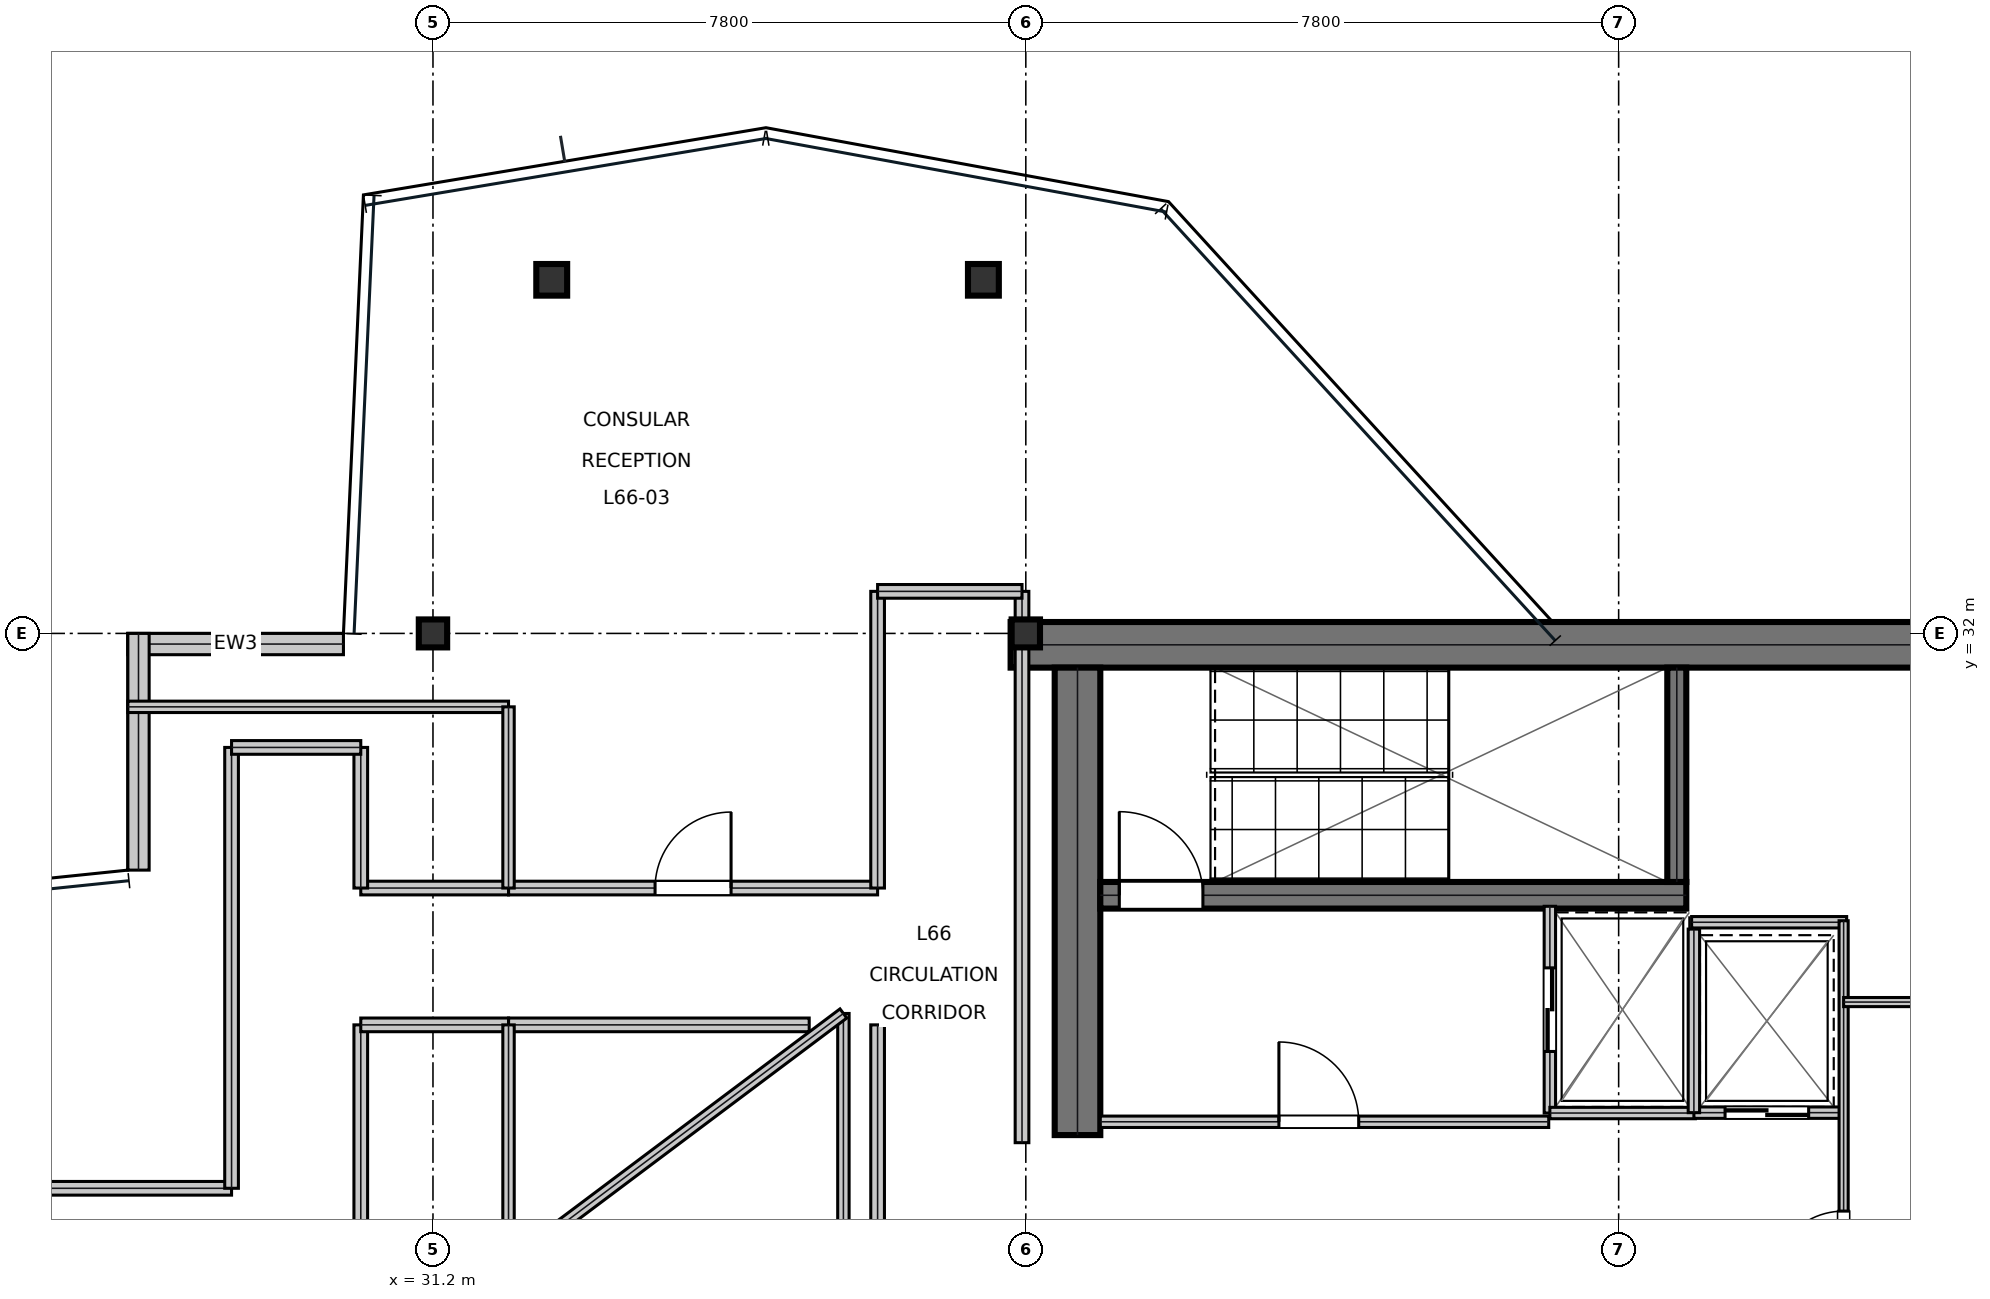
"""IFC4 building model, lengths in metres.
Left out: names, types, materials, properties, quantities, classifications, styles, units other than length and angle.
Written with IfcOpenShell. Run it as: python <this file> out.ifc"""

import sys

from ifc_helpers import new_model, si_unit, direction, frame, frame_2d, origin, origin_2d, place, context, subcontext, project, spatial, rectangle, i_section, extrude, element, fill, save


model = new_model("IFC4")
c1 = context("Model", 3, precision=1e-05, world=origin(), true_north=direction((0.0, 1.0)))
c2 = subcontext(c1, "Body", "Model", "MODEL_VIEW")
j1 = project(units=[si_unit("LENGTHUNIT", "METRE"), si_unit("PLANEANGLEUNIT", "RADIAN")], contexts=[c1])
p1 = place(None, origin())
s1 = spatial("IfcSite", under=j1, at=p1, CompositionType="ELEMENT")
p2 = place(p1, origin())
s2 = spatial("IfcBuilding", under=s1, at=p2, CompositionType="ELEMENT")
p3 = place(p2, frame((0.0, 0.0, 283.05)))
s3 = spatial("IfcBuildingStorey", under=s2, at=p3, CompositionType="ELEMENT", Elevation=283.05)
p4 = place(p3, frame((38.8, 31.85, 0.0), z_axis=(0.0, 0.0, 1.0), x_axis=(1.0, 0.0, 0.0)))
e1 = element("IfcWall", 1, at=p4, inside=s3, PredefinedType="SHEAR", context=c2, shape_type="SweptSolid", body=[
    extrude(rectangle(XDim=16.0, YDim=0.6, at=frame_2d((8.0, 0.0))), origin(), (0.0, 0.0, 1.0), 3.81),
])
p5 = place(p3, frame((39.68, 25.4, 0.0), z_axis=(0.0, 0.0, 1.0), x_axis=(0.0, 1.0, 0.0)))
e2 = element("IfcWall", 2, at=p5, inside=s3, PredefinedType="SHEAR", context=c2, shape_type="SweptSolid", body=[
    extrude(rectangle(XDim=6.15, YDim=0.6, at=frame_2d((3.075, 0.0))), origin(), (0.0, 0.0, 1.0), 3.81),
])
p6 = place(p3, frame((39.98, 28.555, 0.0), z_axis=(0.0, 0.0, 1.0), x_axis=(1.0, 0.0, 0.0)))
e3 = element("IfcWall", 3, at=p6, inside=s3, PredefinedType="SHEAR", context=c2, shape_type="SweptSolid", body=[
    extrude(rectangle(XDim=7.71, YDim=0.35, at=frame_2d((3.855, 0.0))), origin(), (0.0, 0.0, 1.0), 3.81),
])
p7 = place(p6, frame((0.25, 0.0, 0.0)))
e4 = element("IfcOpeningElement", 4, at=p7, cuts=e3, PredefinedType="OPENING", context=c2, shape_type="SweptSolid", body=[
    extrude(rectangle(XDim=1.1, YDim=2.15, at=frame_2d((0.55, 1.075))), frame((0.0, 0.185, 0.0), z_axis=(0.0, -1.0, 0.0), x_axis=(1.0, 0.0, 0.0)), (0.0, 0.0, 1.0), 0.37),
])
p8 = place(p3, frame((47.565, 28.73, 0.0), z_axis=(0.0, 0.0, 1.0), x_axis=(0.0, 1.0, 0.0)))
e5 = element("IfcWall", 5, at=p8, inside=s3, PredefinedType="SHEAR", context=c2, shape_type="SweptSolid", body=[
    extrude(rectangle(XDim=2.82, YDim=0.25, at=frame_2d((1.41, 0.0))), origin(), (0.0, 0.0, 1.0), 3.81),
])
for number, where, z_axis, x_axis in (
    (6, (31.2, 32.0, 0.0), (0.0, 0.0, 1.0), (1.0, 0.0, 0.0)),
    (7, (39.0, 32.0, 0.0), (0.0, 0.0, 1.0), (1.0, 0.0, 0.0)),
):
    element("IfcColumn", number, at=place(p3, frame(where, z_axis=z_axis, x_axis=x_axis)), inside=s3, PredefinedType="COLUMN", context=c2, shape_type="SweptSolid", body=[
        extrude(i_section(OverallWidth=0.373, OverallDepth=0.368, WebThickness=0.015, FlangeThickness=0.024, at=origin_2d()), origin(), (0.0, 0.0, 1.0), 4.044),
    ])
for number, where, z_axis, x_axis in (
    (8, (32.762, 36.652, 0.016), (0.0, 0.0, 1.0), (1.0, 0.0, 0.0)),
    (9, (38.442, 36.652, 0.016), (0.0, 0.0, 1.0), (1.0, 0.0, 0.0)),
):
    element("IfcColumn", number, at=place(p3, frame(where, z_axis=z_axis, x_axis=x_axis)), inside=s3, PredefinedType="COLUMN", context=c2, shape_type="SweptSolid", body=[
        extrude(i_section(OverallWidth=0.406, OverallDepth=0.416, WebThickness=0.03, FlangeThickness=0.048, at=origin_2d()), origin(), (0.0, 0.0, 1.0), 4.018),
    ])
p9 = place(p3, frame((30.022, 31.86, 0.0), z_axis=(0.0, 0.0, 1.0), x_axis=(-1.0, 0.0, 0.0)))
e10 = element("IfcWall", 10, at=p9, inside=s3, PredefinedType="STANDARD", context=c2, shape_type="SweptSolid", body=[
    extrude(rectangle(XDim=2.836, YDim=0.28, at=frame_2d((1.418, 0.0))), origin(), (0.0, 0.0, 1.0), 3.81),
])
p10 = place(p3, frame((27.326, 32.0, 0.0), z_axis=(0.0, 0.0, 1.0), x_axis=(0.0, -1.0, 0.0)))
e11 = element("IfcWall", 11, at=p10, inside=s3, PredefinedType="STANDARD", context=c2, shape_type="SweptSolid", body=[
    extrude(rectangle(XDim=3.114, YDim=0.28, at=frame_2d((1.557, 0.0))), origin(), (0.0, 0.0, 1.0), 3.339),
])
p11 = place(p3, frame((39.98, 25.575, 0.0), z_axis=(0.0, 0.0, 1.0), x_axis=(1.0, 0.0, 0.0)))
e12 = element("IfcWall", 12, at=p11, inside=s3, PredefinedType="PARTITIONING", context=c2, shape_type="SweptSolid", body=[
    extrude(rectangle(XDim=5.9, YDim=0.15, at=frame_2d((2.95, 0.0))), origin(), (0.0, 0.0, 1.0), 3.81),
])
p12 = place(p11, frame((2.35, 0.0, 0.0)))
e13 = element("IfcOpeningElement", 13, at=p12, cuts=e12, PredefinedType="OPENING", context=c2, shape_type="SweptSolid", body=[
    extrude(rectangle(XDim=1.05, YDim=2.15, at=frame_2d((0.525, 1.075))), frame((0.0, 0.085, 0.0), z_axis=(0.0, -1.0, 0.0), x_axis=(1.0, 0.0, 0.0)), (0.0, 0.0, 1.0), 0.17),
])
p13 = place(p3, frame((45.895, 25.69, 0.0), z_axis=(0.0, 0.0, 1.0), x_axis=(0.0, 1.0, 0.0)))
e14 = element("IfcWall", 14, at=p13, inside=s3, PredefinedType="PARTITIONING", context=c2, shape_type="SweptSolid", body=[
    extrude(rectangle(XDim=2.72, YDim=0.15, at=frame_2d((1.36, 0.0))), origin(), (0.0, 0.0, 1.0), 3.81),
])
p14 = place(p13, frame((0.81, 0.0, 0.0)))
e15 = element("IfcOpeningElement", 15, at=p14, cuts=e14, PredefinedType="OPENING", context=c2, shape_type="SweptSolid", body=[
    extrude(rectangle(XDim=1.1, YDim=2.15, at=frame_2d((0.55, 1.075))), frame((0.0, 0.085, 0.0), z_axis=(0.0, -1.0, 0.0), x_axis=(1.0, 0.0, 0.0)), (0.0, 0.0, 1.0), 0.17),
])
p15 = place(p3, frame((45.895, 25.69, 0.0), z_axis=(0.0, 0.0, 1.0), x_axis=(1.0, 0.0, 0.0)))
e16 = element("IfcWall", 16, at=p15, inside=s3, PredefinedType="PARTITIONING", context=c2, shape_type="SweptSolid", body=[
    extrude(rectangle(XDim=1.915, YDim=0.15, at=frame_2d((0.958, 0.0))), origin(), (0.0, 0.0, 1.0), 3.81),
])
p16 = place(p3, frame((47.79, 25.695, 0.0), z_axis=(0.0, 0.0, 1.0), x_axis=(1.0, 0.0, 0.0)))
e17 = element("IfcWall", 17, at=p16, inside=s3, PredefinedType="PARTITIONING", context=c2, shape_type="SweptSolid", body=[
    extrude(rectangle(XDim=1.92, YDim=0.15, at=frame_2d((0.96, 0.0))), origin(), (0.0, 0.0, 1.0), 3.81),
])
p17 = place(p16, frame((0.41, 0.0, 0.0)))
e18 = element("IfcOpeningElement", 18, at=p17, cuts=e17, PredefinedType="OPENING", context=c2, shape_type="SweptSolid", body=[
    extrude(rectangle(XDim=1.1, YDim=2.15, at=frame_2d((0.55, 1.075))), frame((0.0, 0.085, 0.0), z_axis=(0.0, -1.0, 0.0), x_axis=(1.0, 0.0, 0.0)), (0.0, 0.0, 1.0), 0.17),
])
p18 = place(p3, frame((47.79, 25.695, 0.0), z_axis=(0.0, 0.0, 1.0), x_axis=(0.0, 1.0, 0.0)))
e19 = element("IfcWall", 19, at=p18, inside=s3, PredefinedType="PARTITIONING", context=c2, shape_type="SweptSolid", body=[
    extrude(rectangle(XDim=2.415, YDim=0.15, at=frame_2d((1.208, 0.0))), origin(), (0.0, 0.0, 1.0), 3.81),
])
p19 = place(p3, frame((47.76, 28.2, 0.0), z_axis=(0.0, 0.0, 1.0), x_axis=(1.0, 0.0, 0.0)))
e20 = element("IfcWall", 20, at=p19, inside=s3, PredefinedType="PARTITIONING", context=c2, shape_type="SweptSolid", body=[
    extrude(rectangle(XDim=2.04, YDim=0.15, at=frame_2d((1.02, 0.0))), origin(), (0.0, 0.0, 1.0), 3.81),
])
p20 = place(p3, frame((49.76, 22.5, 0.0), z_axis=(0.0, 0.0, 1.0), x_axis=(0.0, 1.0, 0.0)))
e21 = element("IfcWall", 21, at=p20, inside=s3, PredefinedType="PARTITIONING", context=c2, shape_type="SweptSolid", body=[
    extrude(rectangle(XDim=5.72, YDim=0.12, at=frame_2d((2.86, 0.0))), origin(), (0.0, 0.0, 1.0), 3.81),
])
p21 = place(p20, frame((0.95, 0.0, 0.0)))
e22 = element("IfcOpeningElement", 22, at=p21, cuts=e21, PredefinedType="OPENING", context=c2, shape_type="SweptSolid", body=[
    extrude(rectangle(XDim=0.95, YDim=2.15, at=frame_2d((0.475, 1.075))), frame((0.0, 0.07, 0.0), z_axis=(0.0, -1.0, 0.0), x_axis=(1.0, 0.0, 0.0)), (0.0, 0.0, 1.0), 0.14),
])
p22 = place(p3, frame((49.76, 27.15, 0.0), z_axis=(0.0, 0.0, 1.0), x_axis=(1.0, 0.0, 0.0)))
e23 = element("IfcWall", 23, at=p22, inside=s3, PredefinedType="PARTITIONING", context=c2, shape_type="SweptSolid", body=[
    extrude(rectangle(XDim=3.9, YDim=0.12, at=frame_2d((1.95, 0.0))), origin(), (0.0, 0.0, 1.0), 3.81),
])
p23 = place(p22, frame((1.6, 0.0, 0.0)))
e24 = element("IfcOpeningElement", 24, at=p23, cuts=e23, PredefinedType="OPENING", context=c2, shape_type="SweptSolid", body=[
    extrude(rectangle(XDim=0.85, YDim=2.15, at=frame_2d((0.425, 1.075))), frame((0.0, 0.07, 0.0), z_axis=(0.0, -1.0, 0.0), x_axis=(1.0, 0.0, 0.0)), (0.0, 0.0, 1.0), 0.14),
])
p24 = place(p3, frame((37.05, 15.447, 0.0), z_axis=(0.0, 0.0, 1.0), x_axis=(0.0, 1.0, 0.0)))
e25 = element("IfcWall", 25, at=p24, inside=s3, PredefinedType="SOLIDWALL", context=c2, shape_type="SweptSolid", body=[
    extrude(rectangle(XDim=11.403, YDim=0.18, at=frame_2d((5.702, 0.0))), origin(), (0.0, 0.0, 1.0), 3.27),
])
p25 = place(p24, frame((3.582, 0.0, 0.0)))
e26 = element("IfcOpeningElement", 26, at=p25, cuts=e25, PredefinedType="OPENING", context=c2, shape_type="SweptSolid", body=[
    extrude(rectangle(XDim=1.0, YDim=2.15, at=frame_2d((0.5, 1.075))), frame((0.0, 0.1, 0.0), z_axis=(0.0, -1.0, 0.0), x_axis=(1.0, 0.0, 0.0)), (0.0, 0.0, 1.0), 0.2),
])
p26 = place(p3, frame((30.25, 17.5, 0.0), z_axis=(0.0, 0.0, 1.0), x_axis=(0.0, 1.0, 0.0)))
e27 = element("IfcWall", 27, at=p26, inside=s3, PredefinedType="SOLIDWALL", context=c2, shape_type="SweptSolid", body=[
    extrude(rectangle(XDim=9.35, YDim=0.18, at=frame_2d((4.675, 0.0))), origin(), (0.0, 0.0, 1.0), 3.27),
])
p27 = place(p26, frame((3.815, 0.0, 0.0)))
e28 = element("IfcOpeningElement", 28, at=p27, cuts=e27, PredefinedType="OPENING", context=c2, shape_type="SweptSolid", body=[
    extrude(rectangle(XDim=1.0, YDim=2.15, at=frame_2d((0.5, 1.075))), frame((0.0, 0.1, 0.0), z_axis=(0.0, -1.0, 0.0), x_axis=(1.0, 0.0, 0.0)), (0.0, 0.0, 1.0), 0.2),
])
p28 = place(p3, frame((32.194, 28.65, 0.0), z_axis=(0.0, 0.0, 1.0), x_axis=(1.0, 0.0, 0.0)))
e29 = element("IfcWall", 29, at=p28, inside=s3, PredefinedType="SOLIDWALL", context=c2, shape_type="SweptSolid", body=[
    extrude(rectangle(XDim=4.856, YDim=0.18, at=frame_2d((2.428, 0.0))), origin(), (0.0, 0.0, 1.0), 3.81),
])
p29 = place(p28, frame((1.928, 0.0, 0.0)))
e30 = element("IfcOpeningElement", 30, at=p29, cuts=e29, PredefinedType="OPENING", context=c2, shape_type="SweptSolid", body=[
    extrude(rectangle(XDim=1.0, YDim=2.15, at=frame_2d((0.5, 1.075))), frame((0.0, 0.1, 0.0), z_axis=(0.0, -1.0, 0.0), x_axis=(1.0, 0.0, 0.0)), (0.0, 0.0, 1.0), 0.2),
])
p30 = place(p3, frame((32.194, 26.85, 0.0), z_axis=(0.0, 0.0, 1.0), x_axis=(1.0, 0.0, 0.0)))
e31 = element("IfcWall", 31, at=p30, inside=s3, PredefinedType="SOLIDWALL", context=c2, shape_type="SweptSolid", body=[
    extrude(rectangle(XDim=3.956, YDim=0.18, at=frame_2d((1.978, 0.0))), origin(), (0.0, 0.0, 1.0), 3.81),
])
p31 = place(p3, frame((21.0, 24.7, 0.0), z_axis=(0.0, 0.0, 1.0), x_axis=(1.0, 0.0, 0.0)))
e32 = element("IfcWall", 32, at=p31, inside=s3, PredefinedType="SOLIDWALL", context=c2, shape_type="SweptSolid", body=[
    extrude(rectangle(XDim=7.55, YDim=0.18, at=frame_2d((3.775, 0.0))), origin(), (0.0, 0.0, 1.0), 3.27),
])
p32 = place(p3, frame((28.55, 24.7, 0.0), z_axis=(0.0, 0.0, 1.0), x_axis=(0.0, 1.0, 0.0)))
e33 = element("IfcWall", 33, at=p32, inside=s3, PredefinedType="SOLIDWALL", context=c2, shape_type="SweptSolid", body=[
    extrude(rectangle(XDim=5.8, YDim=0.18, at=frame_2d((2.9, 0.0))), origin(), (0.0, 0.0, 1.0), 3.81),
])
for number, where, z_axis, x_axis in (
    (34, (30.25, 26.85, 0.0), (0.0, 0.0, 1.0), (1.0, 0.0, 0.0)),
    (35, (30.25, 28.65, 0.0), (0.0, 0.0, 1.0), (1.0, 0.0, 0.0)),
):
    element("IfcWall", number, at=place(p3, frame(where, z_axis=z_axis, x_axis=x_axis)), inside=s3, PredefinedType="SOLIDWALL", context=c2, shape_type="SweptSolid", body=[
        extrude(rectangle(XDim=1.944, YDim=0.18, at=frame_2d((0.972, 0.0))), origin(), (0.0, 0.0, 1.0), 3.27),
    ])
p33 = place(p3, frame((30.25, 28.65, 0.0), z_axis=(0.0, 0.0, 1.0), x_axis=(0.0, 1.0, 0.0)))
e36 = element("IfcWall", 36, at=p33, inside=s3, PredefinedType="SOLIDWALL", context=c2, shape_type="SweptSolid", body=[
    extrude(rectangle(XDim=1.85, YDim=0.18, at=frame_2d((0.925, 0.0))), origin(), (0.0, 0.0, 1.0), 3.81),
])
p34 = place(p3, frame((28.55, 30.5, 0.0), z_axis=(0.0, 0.0, 1.0), x_axis=(1.0, 0.0, 0.0)))
e37 = element("IfcWall", 37, at=p34, inside=s3, PredefinedType="SOLIDWALL", context=c2, shape_type="SweptSolid", body=[
    extrude(rectangle(XDim=1.7, YDim=0.18, at=frame_2d((0.85, 0.0))), origin(), (0.0, 0.0, 1.0), 3.81),
])
p35 = place(p3, frame((38.95, 25.3, 0.0), z_axis=(0.0, 0.0, 1.0), x_axis=(0.0, 1.0, 0.0)))
e38 = element("IfcWall", 38, at=p35, inside=s3, PredefinedType="SOLIDWALL", context=c2, shape_type="SweptSolid", body=[
    extrude(rectangle(XDim=7.253, YDim=0.18, at=frame_2d((3.626, 0.0))), origin(), (0.0, 0.0, 1.0), 3.27),
])
p36 = place(p3, frame((37.05, 28.65, 0.0), z_axis=(0.0, 0.0, 1.0), x_axis=(0.0, 1.0, 0.0)))
e39 = element("IfcWall", 39, at=p36, inside=s3, PredefinedType="SOLIDWALL", context=c2, shape_type="SweptSolid", body=[
    extrude(rectangle(XDim=3.903, YDim=0.18, at=frame_2d((1.952, 0.0))), origin(), (0.0, 0.0, 1.0), 3.27),
])
p37 = place(p3, frame((37.05, 32.553, 0.0), z_axis=(0.0, 0.0, 1.0), x_axis=(1.0, 0.0, 0.0)))
e40 = element("IfcWall", 40, at=p37, inside=s3, PredefinedType="SOLIDWALL", context=c2, shape_type="SweptSolid", body=[
    extrude(rectangle(XDim=1.9, YDim=0.18, at=frame_2d((0.95, 0.0))), origin(), (0.0, 0.0, 1.0), 3.27),
])
p38 = place(p3, frame((32.194, 15.794, 0.0), z_axis=(0.0, 0.0, 1.0), x_axis=(0.0, 1.0, 0.0)))
e41 = element("IfcWall", 41, at=p38, inside=s3, PredefinedType="MOVABLE", context=c2, shape_type="SweptSolid", body=[
    extrude(rectangle(XDim=11.056, YDim=0.15, at=frame_2d((5.528, 0.0))), origin(), (0.0, 0.0, 1.0), 3.27),
])
p39 = place(p3, frame((27.186, 31.034, 0.0), z_axis=(0.0, 0.0, 1.0), x_axis=(1.0, 0.0, 0.0)))
e42 = element("IfcWall", 42, at=p39, inside=s3, PredefinedType="MOVABLE", context=c2, shape_type="SweptSolid", body=[
    extrude(rectangle(XDim=5.009, YDim=0.15, at=frame_2d((2.504, 0.0))), origin(), (0.0, 0.0, 1.0), 3.27),
])
p40 = place(p3, frame((32.194, 28.65, 0.0), z_axis=(0.0, 0.0, 1.0), x_axis=(0.0, 1.0, 0.0)))
e43 = element("IfcWall", 43, at=p40, inside=s3, PredefinedType="MOVABLE", context=c2, shape_type="SweptSolid", body=[
    extrude(rectangle(XDim=2.384, YDim=0.15, at=frame_2d((1.192, 0.0))), origin(), (0.0, 0.0, 1.0), 3.54),
])
p41 = place(p3, frame((36.6, 21.0, 0.0), z_axis=(0.0, 0.0, 1.0), x_axis=(0.0, 1.0, 0.0)))
e44 = element("IfcWall", 44, at=p41, inside=s3, PredefinedType="MOVABLE", context=c2, shape_type="SweptSolid", body=[
    extrude(rectangle(XDim=6.0, YDim=0.15, at=frame_2d((3.0, 0.0))), origin(), (0.0, 0.0, 1.0), 3.81),
])
p42 = place(p3, frame((36.6, 27.0, 0.0), z_axis=(0.0, 0.0, 1.0), x_axis=(-0.8, -0.6, 0.0)))
e45 = element("IfcWall", 45, at=p42, inside=s3, PredefinedType="MOVABLE", context=c2, shape_type="SweptSolid", body=[
    extrude(rectangle(XDim=5.0, YDim=0.15, at=frame_2d((2.5, 0.0))), origin(), (0.0, 0.0, 1.0), 3.81),
])
p43 = place(p12, origin())
e46 = element("IfcDoor", 46, at=p43, inside=s3, OperationType="SINGLE_SWING_LEFT", PredefinedType="DOOR", context=c2, shape_type="SweptSolid", body=[
    extrude(rectangle(XDim=1.05, YDim=2.15, at=frame_2d((0.525, 1.075))), frame((0.0, 0.025, 0.0), z_axis=(0.0, -1.0, 0.0), x_axis=(1.0, 0.0, 0.0)), (0.0, 0.0, 1.0), 0.05),
])
fill(e13, e46)
p44 = place(p14, frame((1.1, 0.0, 0.0), z_axis=(0.0, 0.0, 1.0), x_axis=(-1.0, 0.0, 0.0)))
e47 = element("IfcDoor", 47, at=p44, inside=s3, OperationType="DOUBLE_DOOR_SLIDING", PredefinedType="DOOR", context=c2, shape_type="SweptSolid", body=[
    extrude(rectangle(XDim=1.1, YDim=2.15, at=frame_2d((0.55, 1.075))), frame((0.0, 0.025, 0.0), z_axis=(0.0, -1.0, 0.0), x_axis=(1.0, 0.0, 0.0)), (0.0, 0.0, 1.0), 0.05),
])
fill(e15, e47)
p45 = place(p17, frame((1.1, 0.0, 0.0), z_axis=(0.0, 0.0, 1.0), x_axis=(-1.0, 0.0, 0.0)))
e48 = element("IfcDoor", 48, at=p45, inside=s3, OperationType="DOUBLE_DOOR_SLIDING", PredefinedType="DOOR", context=c2, shape_type="SweptSolid", body=[
    extrude(rectangle(XDim=1.1, YDim=2.15, at=frame_2d((0.55, 1.075))), frame((0.0, 0.025, 0.0), z_axis=(0.0, -1.0, 0.0), x_axis=(1.0, 0.0, 0.0)), (0.0, 0.0, 1.0), 0.05),
])
fill(e18, e48)
p46 = place(p21, origin())
e49 = element("IfcDoor", 49, at=p46, inside=s3, OperationType="SINGLE_SWING_LEFT", PredefinedType="DOOR", context=c2, shape_type="SweptSolid", body=[
    extrude(rectangle(XDim=0.95, YDim=2.15, at=frame_2d((0.475, 1.075))), frame((0.0, 0.025, 0.0), z_axis=(0.0, -1.0, 0.0), x_axis=(1.0, 0.0, 0.0)), (0.0, 0.0, 1.0), 0.05),
])
fill(e22, e49)
p47 = place(p29, origin())
e50 = element("IfcDoor", 50, at=p47, inside=s3, OperationType="SINGLE_SWING_RIGHT", PredefinedType="DOOR", context=c2, shape_type="SweptSolid", body=[
    extrude(rectangle(XDim=1.0, YDim=2.15, at=frame_2d((0.5, 1.075))), frame((0.0, 0.025, 0.0), z_axis=(0.0, -1.0, 0.0), x_axis=(1.0, 0.0, 0.0)), (0.0, 0.0, 1.0), 0.05),
])
fill(e30, e50)
p48 = place(p7, origin())
e51 = element("IfcDoor", 51, at=p48, inside=s3, OperationType="SINGLE_SWING_LEFT", PredefinedType="DOOR", context=c2, shape_type="SweptSolid", body=[
    extrude(rectangle(XDim=1.1, YDim=2.15, at=frame_2d((0.55, 1.075))), frame((0.0, 0.025, 0.0), z_axis=(0.0, -1.0, 0.0), x_axis=(1.0, 0.0, 0.0)), (0.0, 0.0, 1.0), 0.05),
])
fill(e4, e51)
save(model, sys.argv[1])
